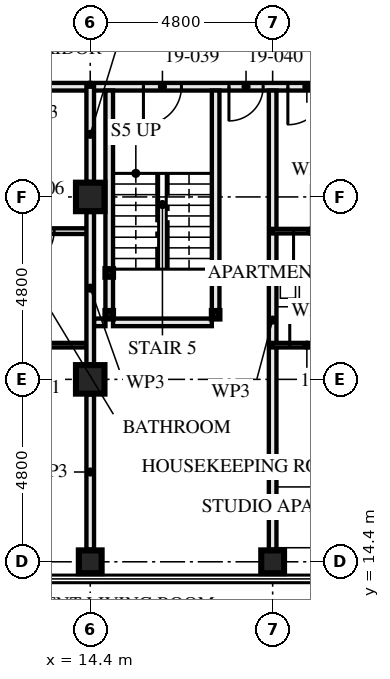
"""IFC4 building model, lengths in metres.
Left out: names, types, materials, properties, quantities, classifications, styles, units other than length and angle.
Written with IfcOpenShell. Run it as: python <this file> out.ifc"""

import sys

from ifc_helpers import new_model, si_unit, direction, frame, frame_2d, origin, origin_2d, place, context, subcontext, project, spatial, rectangle, hollow_rectangle, extrude, element, fill, save


model = new_model("IFC4")
c1 = context("Model", 3, precision=1e-05, world=origin(), true_north=direction((0.0, 1.0)))
c2 = subcontext(c1, "Body", "Model", "MODEL_VIEW")
j1 = project(units=[si_unit("LENGTHUNIT", "METRE"), si_unit("PLANEANGLEUNIT", "RADIAN")], contexts=[c1])
p1 = place(None, origin())
s1 = spatial("IfcSite", under=j1, at=p1, CompositionType="ELEMENT")
p2 = place(p1, origin())
s2 = spatial("IfcBuilding", under=s1, at=p2, CompositionType="ELEMENT")
p3 = place(p2, frame((0.0, 0.0, 72.5)))
s3 = spatial("IfcBuildingStorey", under=s2, at=p3, CompositionType="ELEMENT", Elevation=72.5)
p4 = place(p3, frame((14.4, 14.4, 0.0), z_axis=(0.0, 0.0, 1.0), x_axis=(0.0, 1.0, 0.0)))
e1 = element("IfcColumn", 1, at=p4, inside=s3, PredefinedType="COLUMN", context=c2, shape_type="SweptSolid", body=[
    extrude(hollow_rectangle(XDim=0.6, YDim=0.6, WallThickness=0.08, at=origin_2d()), origin(), (0.0, 0.0, 1.0), 3.5),
])
for number, where, z_axis, x_axis in (
    (2, (14.4, 19.2, 0.0), (0.0, 0.0, 1.0), (1.0, 0.0, 0.0)),
    (3, (14.4, 24.0, 0.0), (0.0, 0.0, 1.0), (1.0, 0.0, 0.0)),
):
    element("IfcColumn", number, at=place(p3, frame(where, z_axis=z_axis, x_axis=x_axis)), inside=s3, PredefinedType="COLUMN", context=c2, shape_type="SweptSolid", body=[
        extrude(hollow_rectangle(XDim=0.75, YDim=0.75, WallThickness=0.08, at=origin_2d()), origin(), (0.0, 0.0, 1.0), 3.5),
    ])
p5 = place(p3, frame((19.2, 14.4, 0.0), z_axis=(0.0, 0.0, 1.0), x_axis=(0.0, 1.0, 0.0)))
e4 = element("IfcColumn", 4, at=p5, inside=s3, PredefinedType="COLUMN", context=c2, shape_type="SweptSolid", body=[
    extrude(hollow_rectangle(XDim=0.6, YDim=0.6, WallThickness=0.08, at=origin_2d()), origin(), (0.0, 0.0, 1.0), 3.5),
])
for number, where, z_axis, x_axis in (
    (5, (14.9, 20.9, 0.0), (0.0, 0.0, 1.0), (1.0, 0.0, 0.0)),
    (6, (17.7, 20.9, 0.0), (0.0, 0.0, 1.0), (1.0, 0.0, 0.0)),
    (7, (14.9, 22.0, 0.0), (0.0, 0.0, 1.0), (1.0, 0.0, 0.0)),
    (8, (17.7, 22.0, 0.0), (0.0, 0.0, 1.0), (1.0, 0.0, 0.0)),
):
    element("IfcColumn", number, at=place(p3, frame(where, z_axis=z_axis, x_axis=x_axis)), inside=s3, PredefinedType="COLUMN", context=c2, shape_type="SweptSolid", body=[
        extrude(hollow_rectangle(XDim=0.2, YDim=0.2, WallThickness=0.008, at=origin_2d()), origin(), (0.0, 0.0, 1.0), 3.33),
    ])
p6 = place(p3, frame((11.6, 23.1, 0.0), z_axis=(0.0, 0.0, 1.0), x_axis=(1.0, 0.0, 0.0)))
e9 = element("IfcWall", 9, at=p6, inside=s3, PredefinedType="PARTITIONING", context=c2, shape_type="SweptSolid", body=[
    extrude(rectangle(XDim=2.8, YDim=0.15, at=frame_2d((1.4, 0.0))), origin(), (0.0, 0.0, 1.0), 3.33),
])
p7 = place(p6, frame((0.95, 0.0, 0.0)))
e10 = element("IfcOpeningElement", 10, at=p7, cuts=e9, PredefinedType="OPENING", context=c2, shape_type="SweptSolid", body=[
    extrude(rectangle(XDim=0.9, YDim=2.1, at=frame_2d((0.45, 1.05))), frame((0.0, 0.085, 0.0), z_axis=(0.0, -1.0, 0.0), x_axis=(1.0, 0.0, 0.0)), (0.0, 0.0, 1.0), 0.171),
])
p8 = place(p3, frame((9.6, 20.1, 0.0), z_axis=(0.0, 0.0, 1.0), x_axis=(1.0, 0.0, 0.0)))
e11 = element("IfcWall", 11, at=p8, inside=s3, PredefinedType="PARTITIONING", context=c2, shape_type="SweptSolid", body=[
    extrude(rectangle(XDim=4.8, YDim=0.12, at=frame_2d((2.4, 0.0))), origin(), (0.0, 0.0, 1.0), 3.33),
])
p9 = place(p8, frame((0.45, 0.0, 0.0)))
e12 = element("IfcOpeningElement", 12, at=p9, cuts=e11, PredefinedType="OPENING", context=c2, shape_type="SweptSolid", body=[
    extrude(rectangle(XDim=0.9, YDim=2.1, at=frame_2d((0.45, 1.05))), frame((0.0, 0.071, 0.0), z_axis=(0.0, -1.0, 0.0), x_axis=(1.0, 0.0, 0.0)), (0.0, 0.0, 1.0), 0.141),
])
p10 = place(p3, frame((4.8, 26.9, 0.0), z_axis=(0.0, 0.0, 1.0), x_axis=(1.0, 0.0, 0.0)))
e13 = element("IfcWall", 13, at=p10, inside=s3, PredefinedType="PARTITIONING", context=c2, shape_type="SweptSolid", body=[
    extrude(rectangle(XDim=9.6, YDim=0.2, at=frame_2d((4.8, 0.0))), origin(), (0.0, 0.0, 1.0), 3.33),
])
p11 = place(p10, frame((0.4, 0.0, 0.0)))
e14 = element("IfcOpeningElement", 14, at=p11, cuts=e13, PredefinedType="OPENING", context=c2, shape_type="SweptSolid", body=[
    extrude(rectangle(XDim=1.0, YDim=2.1, at=frame_2d((0.5, 1.05))), frame((0.0, 0.111, 0.0), z_axis=(0.0, -1.0, 0.0), x_axis=(1.0, 0.0, 0.0)), (0.0, 0.0, 1.0), 0.221),
])
p12 = place(p10, frame((5.2, 0.0, 0.0)))
e15 = element("IfcOpeningElement", 15, at=p12, cuts=e13, PredefinedType="OPENING", context=c2, shape_type="SweptSolid", body=[
    extrude(rectangle(XDim=1.0, YDim=2.1, at=frame_2d((0.5, 1.05))), frame((0.0, 0.111, 0.0), z_axis=(0.0, -1.0, 0.0), x_axis=(1.0, 0.0, 0.0)), (0.0, 0.0, 1.0), 0.221),
])
p13 = place(p3, frame((14.9, 21.0, 0.0), z_axis=(0.0, 0.0, 1.0), x_axis=(0.0, 1.0, 0.0)))
e16 = element("IfcWall", 16, at=p13, inside=s3, PredefinedType="SOLIDWALL", context=c2, shape_type="SweptSolid", body=[
    extrude(rectangle(XDim=0.9, YDim=0.2, at=frame_2d((0.45, 0.0))), origin(), (0.0, 0.0, 1.0), 2.99),
])
p14 = place(p3, frame((14.9, 22.1, 0.0), z_axis=(0.0, 0.0, 1.0), x_axis=(0.0, 1.0, 0.0)))
e17 = element("IfcWall", 17, at=p14, inside=s3, PredefinedType="SOLIDWALL", context=c2, shape_type="SweptSolid", body=[
    extrude(rectangle(XDim=4.7, YDim=0.2, at=frame_2d((2.35, 0.0))), origin(), (0.0, 0.0, 1.0), 2.99),
])
p15 = place(p3, frame((17.7, 21.0, 0.0), z_axis=(0.0, 0.0, 1.0), x_axis=(0.0, 1.0, 0.0)))
e18 = element("IfcWall", 18, at=p15, inside=s3, PredefinedType="SOLIDWALL", context=c2, shape_type="SweptSolid", body=[
    extrude(rectangle(XDim=0.9, YDim=0.2, at=frame_2d((0.45, 0.0))), origin(), (0.0, 0.0, 1.0), 2.99),
])
p16 = place(p3, frame((17.7, 22.1, 0.0), z_axis=(0.0, 0.0, 1.0), x_axis=(0.0, 1.0, 0.0)))
e19 = element("IfcWall", 19, at=p16, inside=s3, PredefinedType="SOLIDWALL", context=c2, shape_type="SweptSolid", body=[
    extrude(rectangle(XDim=4.7, YDim=0.2, at=frame_2d((2.35, 0.0))), origin(), (0.0, 0.0, 1.0), 2.99),
])
p17 = place(p3, frame((14.5, 20.7, 0.0), z_axis=(0.0, 0.0, 1.0), x_axis=(1.0, 0.0, 0.0)))
e20 = element("IfcWall", 20, at=p17, inside=s3, PredefinedType="SOLIDWALL", context=c2, shape_type="SweptSolid", body=[
    extrude(rectangle(XDim=0.3, YDim=0.2, at=frame_2d((0.15, 0.0))), origin(), (0.0, 0.0, 1.0), 3.33),
])
p18 = place(p3, frame((15.0, 20.7, 0.0), z_axis=(0.0, 0.0, 1.0), x_axis=(1.0, 0.0, 0.0)))
e21 = element("IfcWall", 21, at=p18, inside=s3, PredefinedType="SOLIDWALL", context=c2, shape_type="SweptSolid", body=[
    extrude(rectangle(XDim=2.6, YDim=0.2, at=frame_2d((1.3, 0.0))), origin(), (0.0, 0.0, 1.0), 3.33),
])
p19 = place(p3, frame((19.2, 14.72, 0.0), z_axis=(0.0, 0.0, 1.0), x_axis=(0.0, 1.0, 0.0)))
e22 = element("IfcWall", 22, at=p19, inside=s3, PredefinedType="PARTITIONING", context=c2, shape_type="SweptSolid", body=[
    extrude(rectangle(XDim=12.08, YDim=0.2, at=frame_2d((6.04, 0.0))), origin(), (0.0, 0.0, 1.0), 2.55),
])
p20 = place(p3, frame((19.2, 23.1, 0.0), z_axis=(0.0, 0.0, 1.0), x_axis=(1.0, 0.0, 0.0)))
e23 = element("IfcWall", 23, at=p20, inside=s3, PredefinedType="PARTITIONING", context=c2, shape_type="SweptSolid", body=[
    extrude(rectangle(XDim=2.0, YDim=0.12, at=frame_2d((1.0, 0.0))), origin(), (0.0, 0.0, 1.0), 3.33),
])
p21 = place(p20, frame((0.55, 0.0, 0.0)))
e24 = element("IfcOpeningElement", 24, at=p21, cuts=e23, PredefinedType="OPENING", context=c2, shape_type="SweptSolid", body=[
    extrude(rectangle(XDim=0.9, YDim=2.1, at=frame_2d((0.45, 1.05))), frame((0.0, 0.071, 0.0), z_axis=(0.0, -1.0, 0.0), x_axis=(1.0, 0.0, 0.0)), (0.0, 0.0, 1.0), 0.141),
])
p22 = place(p3, frame((19.2, 20.1, 0.0), z_axis=(0.0, 0.0, 1.0), x_axis=(1.0, 0.0, 0.0)))
e25 = element("IfcWall", 25, at=p22, inside=s3, PredefinedType="PARTITIONING", context=c2, shape_type="SweptSolid", body=[
    extrude(rectangle(XDim=4.8, YDim=0.12, at=frame_2d((2.4, 0.0))), origin(), (0.0, 0.0, 1.0), 3.33),
])
p23 = place(p22, frame((0.45, 0.0, 0.0)))
e26 = element("IfcOpeningElement", 26, at=p23, cuts=e25, PredefinedType="OPENING", context=c2, shape_type="SweptSolid", body=[
    extrude(rectangle(XDim=0.9, YDim=2.1, at=frame_2d((0.45, 1.05))), frame((0.0, 0.071, 0.0), z_axis=(0.0, -1.0, 0.0), x_axis=(1.0, 0.0, 0.0)), (0.0, 0.0, 1.0), 0.141),
])
p24 = place(p3, frame((14.4, 26.9, 0.0), z_axis=(0.0, 0.0, 1.0), x_axis=(1.0, 0.0, 0.0)))
e27 = element("IfcWall", 27, at=p24, inside=s3, PredefinedType="PARTITIONING", context=c2, shape_type="SweptSolid", body=[
    extrude(rectangle(XDim=14.4, YDim=0.2, at=frame_2d((7.2, 0.0))), origin(), (0.0, 0.0, 1.0), 2.55),
])
p25 = place(p24, frame((1.4, 0.0, 0.0)))
e28 = element("IfcOpeningElement", 28, at=p25, cuts=e27, PredefinedType="OPENING", context=c2, shape_type="SweptSolid", body=[
    extrude(rectangle(XDim=1.0, YDim=2.1, at=frame_2d((0.5, 1.05))), frame((0.0, 0.111, 0.0), z_axis=(0.0, -1.0, 0.0), x_axis=(1.0, 0.0, 0.0)), (0.0, 0.0, 1.0), 0.221),
])
p26 = place(p24, frame((3.65, 0.0, 0.0)))
e29 = element("IfcOpeningElement", 29, at=p26, cuts=e27, PredefinedType="OPENING", context=c2, shape_type="SweptSolid", body=[
    extrude(rectangle(XDim=0.9, YDim=2.1, at=frame_2d((0.45, 1.05))), frame((0.0, 0.111, 0.0), z_axis=(0.0, -1.0, 0.0), x_axis=(1.0, 0.0, 0.0)), (0.0, 0.0, 1.0), 0.221),
])
p27 = place(p24, frame((5.2, 0.0, 0.0)))
e30 = element("IfcOpeningElement", 30, at=p27, cuts=e27, PredefinedType="OPENING", context=c2, shape_type="SweptSolid", body=[
    extrude(rectangle(XDim=1.0, YDim=2.1, at=frame_2d((0.5, 1.05))), frame((0.0, 0.111, 0.0), z_axis=(0.0, -1.0, 0.0), x_axis=(1.0, 0.0, 0.0)), (0.0, 0.0, 1.0), 0.221),
])
p28 = place(p24, frame((10.0, 0.0, 0.0)))
e31 = element("IfcOpeningElement", 31, at=p28, cuts=e27, PredefinedType="OPENING", context=c2, shape_type="SweptSolid", body=[
    extrude(rectangle(XDim=1.0, YDim=2.1, at=frame_2d((0.5, 1.05))), frame((0.0, 0.111, 0.0), z_axis=(0.0, -1.0, 0.0), x_axis=(1.0, 0.0, 0.0)), (0.0, 0.0, 1.0), 0.221),
])
p29 = place(p3, frame((14.4, 14.72, 0.0), z_axis=(0.0, 0.0, 1.0), x_axis=(0.0, 1.0, 0.0)))
e32 = element("IfcWall", 32, at=p29, inside=s3, PredefinedType="PARTITIONING", context=c2, shape_type="SweptSolid", body=[
    extrude(rectangle(XDim=4.085, YDim=0.2, at=frame_2d((2.042, 0.0))), origin(), (0.0, 0.0, 1.0), 2.32),
])
p30 = place(p3, frame((14.4, 19.595, 0.0), z_axis=(0.0, 0.0, 1.0), x_axis=(0.0, 1.0, 0.0)))
e33 = element("IfcWall", 33, at=p30, inside=s3, PredefinedType="PARTITIONING", context=c2, shape_type="SweptSolid", body=[
    extrude(rectangle(XDim=4.01, YDim=0.2, at=frame_2d((2.005, 0.0))), origin(), (0.0, 0.0, 1.0), 2.32),
])
p31 = place(p3, frame((14.4, 24.395, 0.0), z_axis=(0.0, 0.0, 1.0), x_axis=(0.0, 1.0, 0.0)))
e34 = element("IfcWall", 34, at=p31, inside=s3, PredefinedType="PARTITIONING", context=c2, shape_type="SweptSolid", body=[
    extrude(rectangle(XDim=2.505, YDim=0.2, at=frame_2d((1.252, 0.0))), origin(), (0.0, 0.0, 1.0), 2.32),
])
p32 = place(p7, frame((0.9, 0.0, 0.0), z_axis=(0.0, 0.0, 1.0), x_axis=(-1.0, 0.0, 0.0)))
e35 = element("IfcDoor", 35, at=p32, inside=s3, OperationType="SINGLE_SWING_LEFT", PredefinedType="DOOR", context=c2, shape_type="SweptSolid", body=[
    extrude(rectangle(XDim=0.9, YDim=2.1, at=frame_2d((0.45, 1.05))), frame((0.0, 0.022, 0.0), z_axis=(0.0, -1.0, 0.0), x_axis=(1.0, 0.0, 0.0)), (0.0, 0.0, 1.0), 0.044),
])
fill(e10, e35)
p33 = place(p21, frame((0.9, 0.0, 0.0), z_axis=(0.0, 0.0, 1.0), x_axis=(-1.0, 0.0, 0.0)))
e36 = element("IfcDoor", 36, at=p33, inside=s3, OperationType="SINGLE_SWING_LEFT", PredefinedType="DOOR", context=c2, shape_type="SweptSolid", body=[
    extrude(rectangle(XDim=0.9, YDim=2.1, at=frame_2d((0.45, 1.05))), frame((0.0, 0.022, 0.0), z_axis=(0.0, -1.0, 0.0), x_axis=(1.0, 0.0, 0.0)), (0.0, 0.0, 1.0), 0.044),
])
fill(e24, e36)
p34 = place(p23, origin())
e37 = element("IfcDoor", 37, at=p34, inside=s3, OperationType="SINGLE_SWING_RIGHT", PredefinedType="DOOR", context=c2, shape_type="SweptSolid", body=[
    extrude(rectangle(XDim=0.9, YDim=2.1, at=frame_2d((0.45, 1.05))), frame((0.0, 0.022, 0.0), z_axis=(0.0, -1.0, 0.0), x_axis=(1.0, 0.0, 0.0)), (0.0, 0.0, 1.0), 0.044),
])
fill(e26, e37)
p35 = place(p25, frame((1.0, 0.0, 0.0), z_axis=(0.0, 0.0, 1.0), x_axis=(-1.0, 0.0, 0.0)))
e38 = element("IfcDoor", 38, at=p35, inside=s3, OperationType="SINGLE_SWING_LEFT", PredefinedType="DOOR", context=c2, shape_type="SweptSolid", body=[
    extrude(rectangle(XDim=1.0, YDim=2.1, at=frame_2d((0.5, 1.05))), frame((0.0, 0.032, 0.0), z_axis=(0.0, -1.0, 0.0), x_axis=(1.0, 0.0, 0.0)), (0.0, 0.0, 1.0), 0.064),
])
fill(e28, e38)
p36 = place(p26, frame((0.9, 0.0, 0.0), z_axis=(0.0, 0.0, 1.0), x_axis=(-1.0, 0.0, 0.0)))
e39 = element("IfcDoor", 39, at=p36, inside=s3, OperationType="SINGLE_SWING_LEFT", PredefinedType="DOOR", context=c2, shape_type="SweptSolid", body=[
    extrude(rectangle(XDim=0.9, YDim=2.1, at=frame_2d((0.45, 1.05))), frame((0.0, 0.027, 0.0), z_axis=(0.0, -1.0, 0.0), x_axis=(1.0, 0.0, 0.0)), (0.0, 0.0, 1.0), 0.054),
])
fill(e29, e39)
p37 = place(p27, frame((1.0, 0.0, 0.0), z_axis=(0.0, 0.0, 1.0), x_axis=(-1.0, 0.0, 0.0)))
e40 = element("IfcDoor", 40, at=p37, inside=s3, OperationType="SINGLE_SWING_LEFT", PredefinedType="DOOR", context=c2, shape_type="SweptSolid", body=[
    extrude(rectangle(XDim=1.0, YDim=2.1, at=frame_2d((0.5, 1.05))), frame((0.0, 0.027, 0.0), z_axis=(0.0, -1.0, 0.0), x_axis=(1.0, 0.0, 0.0)), (0.0, 0.0, 1.0), 0.054),
])
fill(e30, e40)
save(model, sys.argv[1])
